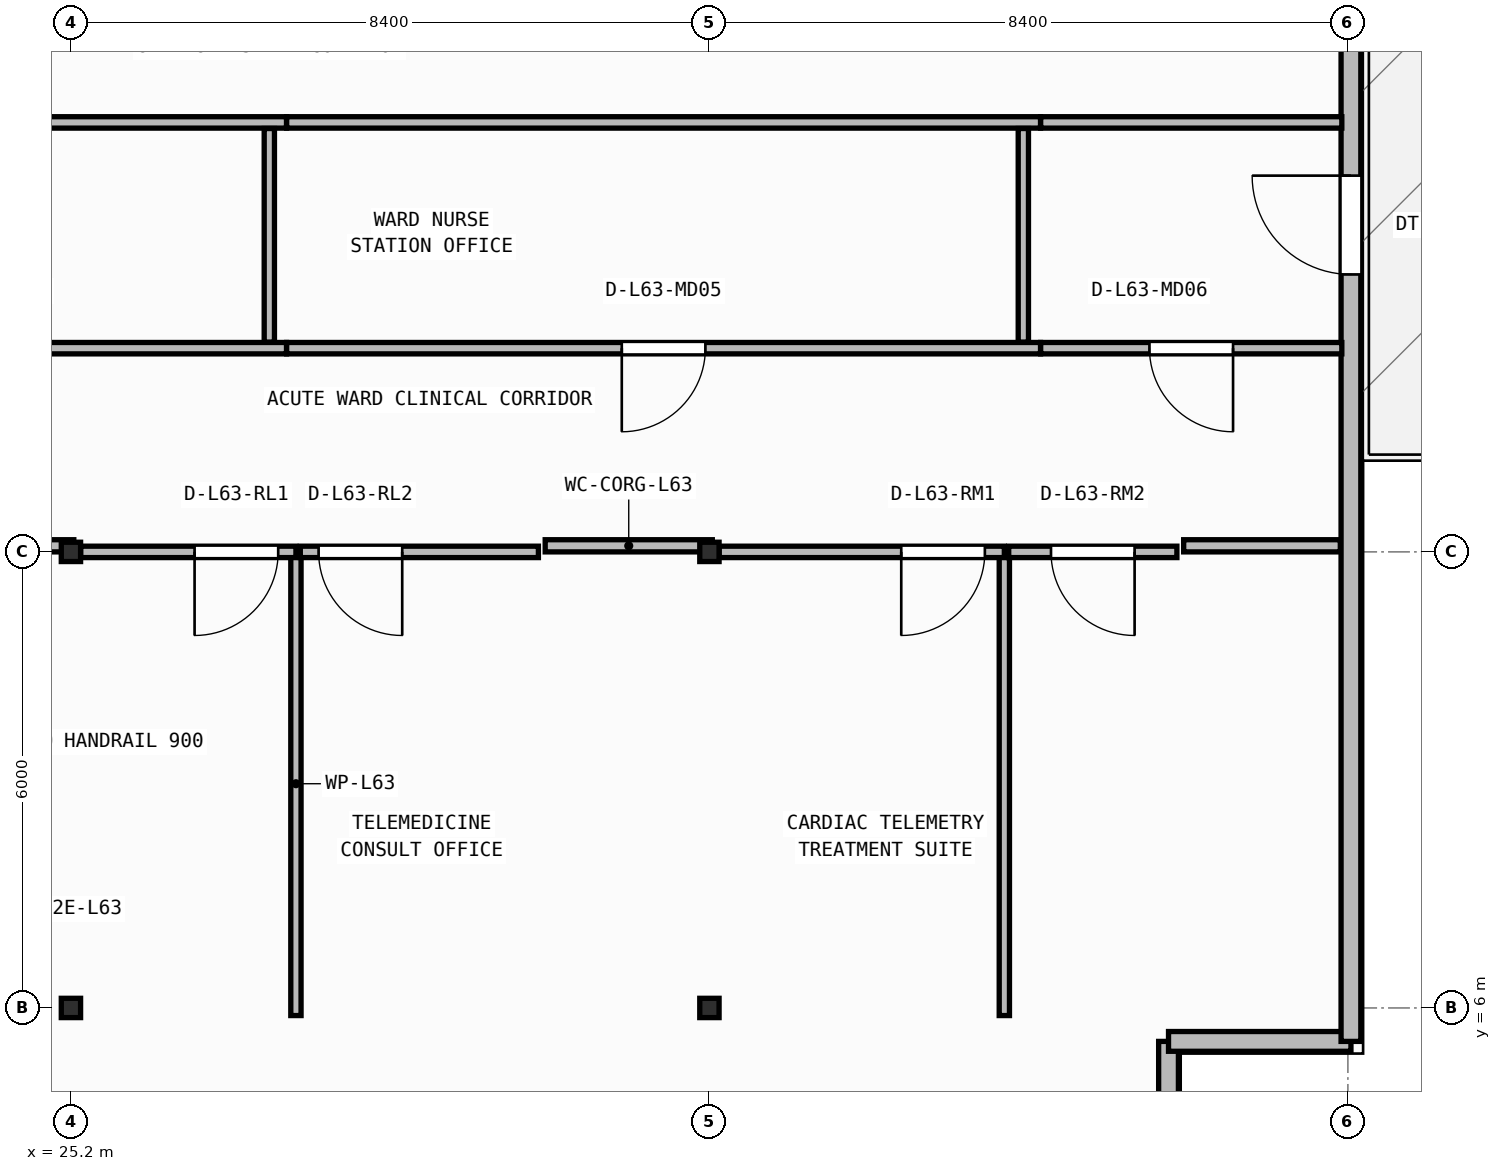
"""IFC4 building model, lengths in metres.
Left out: names, types, materials, properties, quantities, classifications, styles, units other than length and angle.
Written with IfcOpenShell. Run it as: python <this file> out.ifc"""

import sys

from ifc_helpers import new_model, si_unit, direction, frame, frame_2d, origin, origin_2d, place, context, subcontext, project, spatial, rectangle, i_section, extrude, element, fill, save


model = new_model("IFC4")
c1 = context("Model", 3, precision=1e-05, world=origin(), true_north=direction((0.0, 1.0)))
c2 = subcontext(c1, "Body", "Model", "MODEL_VIEW")
j1 = project(units=[si_unit("LENGTHUNIT", "METRE"), si_unit("PLANEANGLEUNIT", "RADIAN")], contexts=[c1])
p1 = place(None, origin())
s1 = spatial("IfcSite", under=j1, at=p1, CompositionType="ELEMENT")
p2 = place(p1, origin())
s2 = spatial("IfcBuilding", under=s1, at=p2, CompositionType="ELEMENT")
p3 = place(p2, frame((0.0, 0.0, 256.55)))
s3 = spatial("IfcBuildingStorey", under=s2, at=p3, CompositionType="ELEMENT", Elevation=256.55)
for number, where, z_axis, x_axis in (
    (1, (25.2, 6.0, 0.0), (0.0, 0.0, 1.0), (1.0, 0.0, 0.0)),
    (2, (33.6, 6.0, 0.0), (0.0, 0.0, 1.0), (1.0, 0.0, 0.0)),
    (3, (25.2, 12.0, 0.0), (0.0, 0.0, 1.0), (1.0, 0.0, 0.0)),
    (4, (33.6, 12.0, 0.0), (0.0, 0.0, 1.0), (1.0, 0.0, 0.0)),
):
    element("IfcColumn", number, at=place(p3, frame(where, z_axis=z_axis, x_axis=x_axis)), inside=s3, PredefinedType="COLUMN", context=c2, shape_type="SweptSolid", body=[
        extrude(i_section(OverallWidth=0.254, OverallDepth=0.254, WebThickness=0.009, FlangeThickness=0.014, FilletRadius=0.013, at=origin_2d()), origin(), (0.0, 0.0, 1.0), 3.95),
    ])
p4 = place(p3, frame((39.64, 3.148, 0.0), z_axis=(0.0, 0.0, 1.0), x_axis=(0.0, 1.0, 0.0)))
e5 = element("IfcWall", 5, at=p4, inside=s3, PredefinedType="STANDARD", context=c2, shape_type="SweptSolid", body=[
    extrude(rectangle(XDim=2.412, YDim=0.26, at=frame_2d((1.206, 0.0))), origin(), (0.0, 0.0, 1.0), 3.71),
])
p5 = place(p3, frame((39.64, 5.56, 0.0), z_axis=(0.0, 0.0, 1.0), x_axis=(1.0, 0.0, 0.0)))
e6 = element("IfcWall", 6, at=p5, inside=s3, PredefinedType="STANDARD", context=c2, shape_type="SweptSolid", body=[
    extrude(rectangle(XDim=2.4, YDim=0.26, at=frame_2d((1.2, 0.0))), origin(), (0.0, 0.0, 1.0), 3.71),
])
p6 = place(p3, frame((42.04, 5.56, 0.0), z_axis=(0.0, 0.0, 1.0), x_axis=(0.0, 1.0, 0.0)))
e7 = element("IfcWall", 7, at=p6, inside=s3, PredefinedType="STANDARD", context=c2, shape_type="SweptSolid", body=[
    extrude(rectangle(XDim=21.48, YDim=0.26, at=frame_2d((10.74, 0.0))), origin(), (0.0, 0.0, 1.0), 3.71),
])
p7 = place(p6, frame((10.09, 0.0, 0.0)))
e8 = element("IfcOpeningElement", 8, at=p7, cuts=e7, PredefinedType="OPENING", context=c2, shape_type="SweptSolid", body=[
    extrude(rectangle(XDim=1.3, YDim=2.15, at=frame_2d((0.65, 1.075))), frame((0.0, 0.14, 0.0), z_axis=(0.0, -1.0, 0.0), x_axis=(1.0, 0.0, 0.0)), (0.0, 0.0, 1.0), 0.28),
])
p8 = place(p3, frame((28.16, 5.9, 0.0), z_axis=(0.0, 0.0, 1.0), x_axis=(0.0, 1.0, 0.0)))
e9 = element("IfcWall", 9, at=p8, inside=s3, PredefinedType="PARTITIONING", context=c2, shape_type="SweptSolid", body=[
    extrude(rectangle(XDim=6.1, YDim=0.135, at=frame_2d((3.05, 0.0))), origin(), (0.0, 0.0, 1.0), 3.71),
])
p9 = place(p3, frame((28.16, 12.0, 0.0), z_axis=(0.0, 0.0, 1.0), x_axis=(-1.0, 0.0, 0.0)))
e10 = element("IfcWall", 10, at=p9, inside=s3, PredefinedType="PARTITIONING", context=c2, shape_type="SweptSolid", body=[
    extrude(rectangle(XDim=2.833, YDim=0.15, at=frame_2d((1.417, 0.0))), origin(), (0.0, 0.0, 1.0), 3.157),
])
p10 = place(p9, frame((0.233, 0.0, 0.0)))
e11 = element("IfcOpeningElement", 11, at=p10, cuts=e10, PredefinedType="OPENING", context=c2, shape_type="SweptSolid", body=[
    extrude(rectangle(XDim=1.1, YDim=2.1, at=frame_2d((0.55, 1.05))), frame((0.0, 0.085, 0.0), z_axis=(0.0, -1.0, 0.0), x_axis=(1.0, 0.0, 0.0)), (0.0, 0.0, 1.0), 0.17),
])
p11 = place(p3, frame((31.35, 12.0, 0.0), z_axis=(0.0, 0.0, 1.0), x_axis=(-1.0, 0.0, 0.0)))
e12 = element("IfcWall", 12, at=p11, inside=s3, PredefinedType="PARTITIONING", context=c2, shape_type="SweptSolid", body=[
    extrude(rectangle(XDim=3.133, YDim=0.15, at=frame_2d((1.566, 0.0))), origin(), (0.0, 0.0, 1.0), 3.157),
])
p12 = place(p11, frame((1.792, 0.0, 0.0)))
e13 = element("IfcOpeningElement", 13, at=p12, cuts=e12, PredefinedType="OPENING", context=c2, shape_type="SweptSolid", body=[
    extrude(rectangle(XDim=1.1, YDim=2.1, at=frame_2d((0.55, 1.05))), frame((0.0, 0.085, 0.0), z_axis=(0.0, -1.0, 0.0), x_axis=(1.0, 0.0, 0.0)), (0.0, 0.0, 1.0), 0.17),
])
p13 = place(p3, frame((37.48, 5.9, 0.0), z_axis=(0.0, 0.0, 1.0), x_axis=(0.0, 1.0, 0.0)))
e14 = element("IfcWall", 14, at=p13, inside=s3, PredefinedType="PARTITIONING", context=c2, shape_type="SweptSolid", body=[
    extrude(rectangle(XDim=6.1, YDim=0.135, at=frame_2d((3.05, 0.0))), origin(), (0.0, 0.0, 1.0), 3.71),
])
p14 = place(p3, frame((37.48, 12.0, 0.0), z_axis=(0.0, 0.0, 1.0), x_axis=(-1.0, 0.0, 0.0)))
e15 = element("IfcWall", 15, at=p14, inside=s3, PredefinedType="PARTITIONING", context=c2, shape_type="SweptSolid", body=[
    extrude(rectangle(XDim=3.753, YDim=0.15, at=frame_2d((1.876, 0.0))), origin(), (0.0, 0.0, 1.0), 3.71),
])
p15 = place(p14, frame((0.256, 0.0, 0.0)))
e16 = element("IfcOpeningElement", 16, at=p15, cuts=e15, PredefinedType="OPENING", context=c2, shape_type="SweptSolid", body=[
    extrude(rectangle(XDim=1.1, YDim=2.1, at=frame_2d((0.55, 1.05))), frame((0.0, 0.085, 0.0), z_axis=(0.0, -1.0, 0.0), x_axis=(1.0, 0.0, 0.0)), (0.0, 0.0, 1.0), 0.17),
])
p16 = place(p3, frame((39.75, 12.0, 0.0), z_axis=(0.0, 0.0, 1.0), x_axis=(-1.0, 0.0, 0.0)))
e17 = element("IfcWall", 17, at=p16, inside=s3, PredefinedType="PARTITIONING", context=c2, shape_type="SweptSolid", body=[
    extrude(rectangle(XDim=2.212, YDim=0.15, at=frame_2d((1.106, 0.0))), origin(), (0.0, 0.0, 1.0), 3.71),
])
p17 = place(p16, frame((0.556, 0.0, 0.0)))
e18 = element("IfcOpeningElement", 18, at=p17, cuts=e17, PredefinedType="OPENING", context=c2, shape_type="SweptSolid", body=[
    extrude(rectangle(XDim=1.1, YDim=2.1, at=frame_2d((0.55, 1.05))), frame((0.0, 0.085, 0.0), z_axis=(0.0, -1.0, 0.0), x_axis=(1.0, 0.0, 0.0)), (0.0, 0.0, 1.0), 0.17),
])
p18 = place(p3, frame((28.036, 14.68, 0.0), z_axis=(0.0, 0.0, 1.0), x_axis=(-1.0, 0.0, 0.0)))
e19 = element("IfcWall", 19, at=p18, inside=s3, PredefinedType="PARTITIONING", context=c2, shape_type="SweptSolid", body=[
    extrude(rectangle(XDim=7.718, YDim=0.15, at=frame_2d((3.859, 0.0))), origin(), (0.0, 0.0, 1.0), 3.71),
])
p19 = place(p18, frame((3.309, 0.0, 0.0)))
e20 = element("IfcOpeningElement", 20, at=p19, cuts=e19, PredefinedType="OPENING", context=c2, shape_type="SweptSolid", body=[
    extrude(rectangle(XDim=1.1, YDim=2.1, at=frame_2d((0.55, 1.05))), frame((0.0, 0.085, 0.0), z_axis=(0.0, -1.0, 0.0), x_axis=(1.0, 0.0, 0.0)), (0.0, 0.0, 1.0), 0.17),
])
p20 = place(p3, frame((37.956, 14.68, 0.0), z_axis=(0.0, 0.0, 1.0), x_axis=(-1.0, 0.0, 0.0)))
e21 = element("IfcWall", 21, at=p20, inside=s3, PredefinedType="PARTITIONING", context=c2, shape_type="SweptSolid", body=[
    extrude(rectangle(XDim=9.918, YDim=0.15, at=frame_2d((4.959, 0.0))), origin(), (0.0, 0.0, 1.0), 3.71),
])
p21 = place(p20, frame((4.409, 0.0, 0.0)))
e22 = element("IfcOpeningElement", 22, at=p21, cuts=e21, PredefinedType="OPENING", context=c2, shape_type="SweptSolid", body=[
    extrude(rectangle(XDim=1.1, YDim=2.1, at=frame_2d((0.55, 1.05))), frame((0.0, 0.085, 0.0), z_axis=(0.0, -1.0, 0.0), x_axis=(1.0, 0.0, 0.0)), (0.0, 0.0, 1.0), 0.17),
])
p22 = place(p3, frame((41.92, 14.68, 0.0), z_axis=(0.0, 0.0, 1.0), x_axis=(-1.0, 0.0, 0.0)))
e23 = element("IfcWall", 23, at=p22, inside=s3, PredefinedType="PARTITIONING", context=c2, shape_type="SweptSolid", body=[
    extrude(rectangle(XDim=3.962, YDim=0.15, at=frame_2d((1.981, 0.0))), origin(), (0.0, 0.0, 1.0), 3.71),
])
p23 = place(p22, frame((1.431, 0.0, 0.0)))
e24 = element("IfcOpeningElement", 24, at=p23, cuts=e23, PredefinedType="OPENING", context=c2, shape_type="SweptSolid", body=[
    extrude(rectangle(XDim=1.1, YDim=2.1, at=frame_2d((0.55, 1.05))), frame((0.0, 0.085, 0.0), z_axis=(0.0, -1.0, 0.0), x_axis=(1.0, 0.0, 0.0)), (0.0, 0.0, 1.0), 0.17),
])
p24 = place(p3, frame((20.318, 17.65, 0.0), z_axis=(0.0, 0.0, 1.0), x_axis=(1.0, 0.0, 0.0)))
e25 = element("IfcWall", 25, at=p24, inside=s3, PredefinedType="PARTITIONING", context=c2, shape_type="SweptSolid", body=[
    extrude(rectangle(XDim=7.718, YDim=0.15, at=frame_2d((3.859, 0.0))), origin(), (0.0, 0.0, 1.0), 3.71),
])
p25 = place(p3, frame((28.038, 17.65, 0.0), z_axis=(0.0, 0.0, 1.0), x_axis=(1.0, 0.0, 0.0)))
e26 = element("IfcWall", 26, at=p25, inside=s3, PredefinedType="PARTITIONING", context=c2, shape_type="SweptSolid", body=[
    extrude(rectangle(XDim=9.918, YDim=0.15, at=frame_2d((4.959, 0.0))), origin(), (0.0, 0.0, 1.0), 3.71),
])
p26 = place(p3, frame((37.958, 17.65, 0.0), z_axis=(0.0, 0.0, 1.0), x_axis=(1.0, 0.0, 0.0)))
e27 = element("IfcWall", 27, at=p26, inside=s3, PredefinedType="PARTITIONING", context=c2, shape_type="SweptSolid", body=[
    extrude(rectangle(XDim=3.962, YDim=0.15, at=frame_2d((1.981, 0.0))), origin(), (0.0, 0.0, 1.0), 3.71),
])
for number, where, z_axis, x_axis in (
    (28, (27.81, 14.76, 0.0), (0.0, 0.0, 1.0), (0.0, 1.0, 0.0)),
    (29, (37.73, 14.76, 0.0), (0.0, 0.0, 1.0), (0.0, 1.0, 0.0)),
):
    element("IfcWall", number, at=place(p3, frame(where, z_axis=z_axis, x_axis=x_axis)), inside=s3, PredefinedType="PARTITIONING", context=c2, shape_type="SweptSolid", body=[
        extrude(rectangle(XDim=2.81, YDim=0.135, at=frame_2d((1.405, 0.0))), origin(), (0.0, 0.0, 1.0), 3.71),
    ])
p27 = place(p3, frame((24.02, 12.08, 0.0), z_axis=(0.0, 0.0, 1.0), x_axis=(1.0, 0.0, 0.0)))
e30 = element("IfcWall", 30, at=p27, inside=s3, PredefinedType="PARTITIONING", context=c2, shape_type="SweptSolid", body=[
    extrude(rectangle(XDim=1.218, YDim=0.16, at=frame_2d((0.609, 0.0))), origin(), (0.0, 0.0, 1.0), 3.157),
])
p28 = place(p3, frame((31.439, 12.08, 0.0), z_axis=(0.0, 0.0, 1.0), x_axis=(1.0, 0.0, 0.0)))
e31 = element("IfcWall", 31, at=p28, inside=s3, PredefinedType="PARTITIONING", context=c2, shape_type="SweptSolid", body=[
    extrude(rectangle(XDim=2.198, YDim=0.16, at=frame_2d((1.099, 0.0))), origin(), (0.0, 0.0, 1.0), 3.157),
])
p29 = place(p3, frame((39.839, 12.08, 0.0), z_axis=(0.0, 0.0, 1.0), x_axis=(1.0, 0.0, 0.0)))
e32 = element("IfcWall", 32, at=p29, inside=s3, PredefinedType="PARTITIONING", context=c2, shape_type="SweptSolid", body=[
    extrude(rectangle(XDim=2.061, YDim=0.16, at=frame_2d((1.03, 0.0))), origin(), (0.0, 0.0, 1.0), 3.71),
])
p30 = place(p7, origin())
e33 = element("IfcDoor", 33, at=p30, inside=s3, OperationType="SINGLE_SWING_RIGHT", PredefinedType="DOOR", context=c2, shape_type="SweptSolid", body=[
    extrude(rectangle(XDim=1.3, YDim=2.15, at=frame_2d((0.65, 1.075))), frame((0.0, 0.025, 0.0), z_axis=(0.0, -1.0, 0.0), x_axis=(1.0, 0.0, 0.0)), (0.0, 0.0, 1.0), 0.05),
])
fill(e8, e33)
p31 = place(p10, origin())
e34 = element("IfcDoor", 34, at=p31, inside=s3, OperationType="SINGLE_SWING_RIGHT", PredefinedType="DOOR", context=c2, shape_type="SweptSolid", body=[
    extrude(rectangle(XDim=1.1, YDim=2.1, at=frame_2d((0.55, 1.05))), frame((0.0, 0.025, 0.0), z_axis=(0.0, -1.0, 0.0), x_axis=(1.0, 0.0, 0.0)), (0.0, 0.0, 1.0), 0.05),
])
fill(e11, e34)
p32 = place(p12, origin())
e35 = element("IfcDoor", 35, at=p32, inside=s3, OperationType="SINGLE_SWING_LEFT", PredefinedType="DOOR", context=c2, shape_type="SweptSolid", body=[
    extrude(rectangle(XDim=1.1, YDim=2.1, at=frame_2d((0.55, 1.05))), frame((0.0, 0.025, 0.0), z_axis=(0.0, -1.0, 0.0), x_axis=(1.0, 0.0, 0.0)), (0.0, 0.0, 1.0), 0.05),
])
fill(e13, e35)
p33 = place(p15, origin())
e36 = element("IfcDoor", 36, at=p33, inside=s3, OperationType="SINGLE_SWING_RIGHT", PredefinedType="DOOR", context=c2, shape_type="SweptSolid", body=[
    extrude(rectangle(XDim=1.1, YDim=2.1, at=frame_2d((0.55, 1.05))), frame((0.0, 0.025, 0.0), z_axis=(0.0, -1.0, 0.0), x_axis=(1.0, 0.0, 0.0)), (0.0, 0.0, 1.0), 0.05),
])
fill(e16, e36)
p34 = place(p17, origin())
e37 = element("IfcDoor", 37, at=p34, inside=s3, OperationType="SINGLE_SWING_LEFT", PredefinedType="DOOR", context=c2, shape_type="SweptSolid", body=[
    extrude(rectangle(XDim=1.1, YDim=2.1, at=frame_2d((0.55, 1.05))), frame((0.0, 0.025, 0.0), z_axis=(0.0, -1.0, 0.0), x_axis=(1.0, 0.0, 0.0)), (0.0, 0.0, 1.0), 0.05),
])
fill(e18, e37)
p35 = place(p21, origin())
e38 = element("IfcDoor", 38, at=p35, inside=s3, OperationType="SINGLE_SWING_RIGHT", PredefinedType="DOOR", context=c2, shape_type="SweptSolid", body=[
    extrude(rectangle(XDim=1.1, YDim=2.1, at=frame_2d((0.55, 1.05))), frame((0.0, 0.025, 0.0), z_axis=(0.0, -1.0, 0.0), x_axis=(1.0, 0.0, 0.0)), (0.0, 0.0, 1.0), 0.05),
])
fill(e22, e38)
p36 = place(p23, origin())
e39 = element("IfcDoor", 39, at=p36, inside=s3, OperationType="SINGLE_SWING_LEFT", PredefinedType="DOOR", context=c2, shape_type="SweptSolid", body=[
    extrude(rectangle(XDim=1.1, YDim=2.1, at=frame_2d((0.55, 1.05))), frame((0.0, 0.025, 0.0), z_axis=(0.0, -1.0, 0.0), x_axis=(1.0, 0.0, 0.0)), (0.0, 0.0, 1.0), 0.05),
])
fill(e24, e39)
save(model, sys.argv[1])
